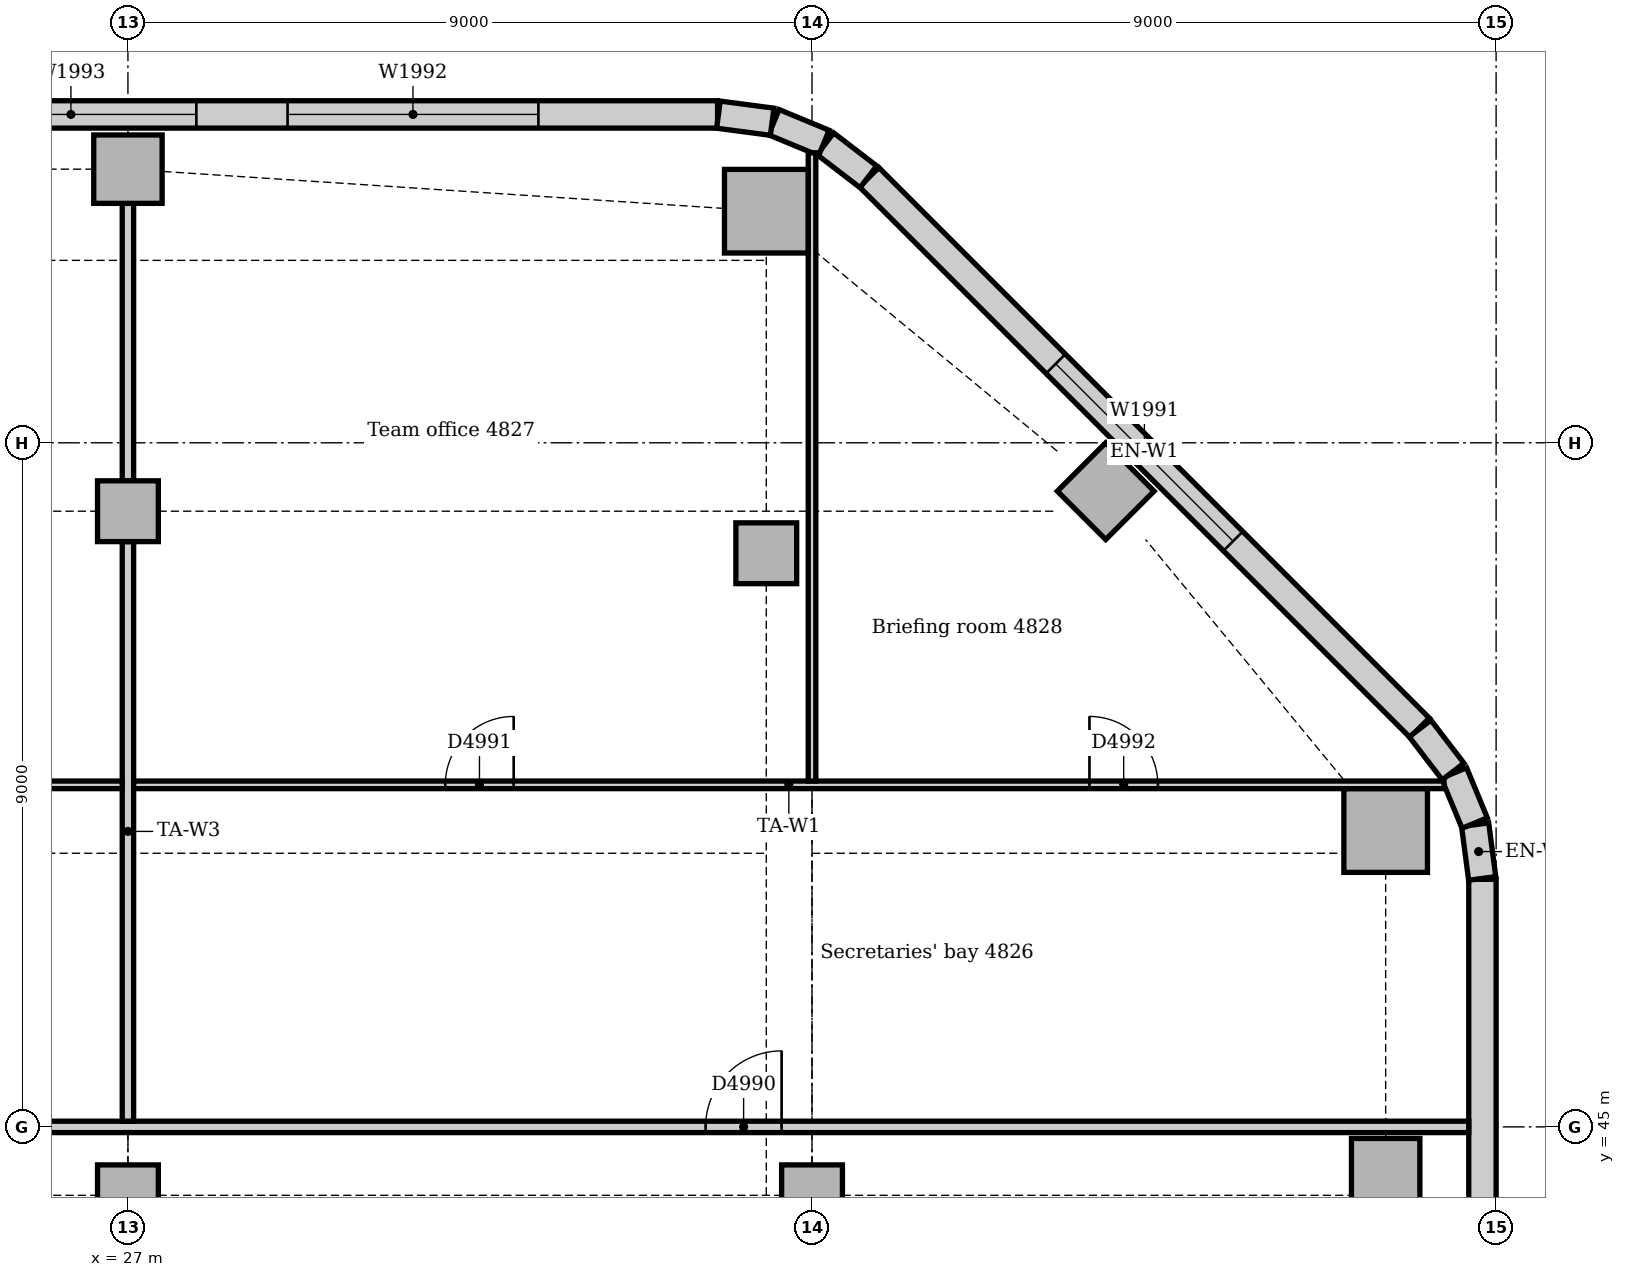
"""IFC4 building model, lengths in metres.
Left out: names, types, materials, properties, quantities, classifications, styles, units other than length and angle.
Written with IfcOpenShell. Run it as: python <this file> out.ifc"""

import sys

from ifc_helpers import new_model, si_unit, direction, frame, frame_2d, origin, origin_2d, place, context, subcontext, project, spatial, rectangle, extrude, element, fill, save


model = new_model("IFC4")
c1 = context("Model", 3, precision=1e-05, world=origin(), true_north=direction((0.0, 1.0)))
c2 = subcontext(c1, "Body", "Model", "MODEL_VIEW")
j1 = project(units=[si_unit("LENGTHUNIT", "METRE"), si_unit("PLANEANGLEUNIT", "RADIAN")], contexts=[c1])
p1 = place(None, origin())
s1 = spatial("IfcSite", under=j1, at=p1, CompositionType="ELEMENT")
p2 = place(p1, origin())
s2 = spatial("IfcBuilding", under=s1, at=p2, CompositionType="ELEMENT")
p3 = place(p2, frame((0.0, 0.0, 202.0)))
s3 = spatial("IfcBuildingStorey", under=s2, at=p3, CompositionType="ELEMENT", Elevation=202.0)
for number, where, z_axis, x_axis in (
    (1, (43.547, 48.898, 0.0), (0.0, 0.0, 1.0), (1.0, 0.0, 0.0)),
    (2, (35.398, 57.047, 0.0), (0.0, 0.0, 1.0), (1.0, 0.0, 0.0)),
):
    element("IfcColumn", number, at=place(p3, frame(where, z_axis=z_axis, x_axis=x_axis)), inside=s3, PredefinedType="COLUMN", context=c2, shape_type="SweptSolid", body=[
        extrude(rectangle(XDim=1.1, YDim=1.1, at=origin_2d()), origin(), (0.0, 0.0, 1.0), 3.85),
    ])
for number, where, z_axis, x_axis in (
    (3, (43.547, 44.398, 0.0), (0.0, 0.0, 1.0), (1.0, 0.0, 0.0)),
    (4, (39.864, 53.364, 0.0), (0.0, 0.0, 1.0), (0.707, 0.707, 0.0)),
    (5, (27.0, 57.6, 0.0), (0.0, 0.0, 1.0), (1.0, 0.0, 0.0)),
):
    element("IfcColumn", number, at=place(p3, frame(where, z_axis=z_axis, x_axis=x_axis)), inside=s3, PredefinedType="COLUMN", context=c2, shape_type="SweptSolid", body=[
        extrude(rectangle(XDim=0.9, YDim=0.9, at=origin_2d()), origin(), (0.0, 0.0, 1.0), 3.85),
    ])
for number, where, z_axis, x_axis in (
    (6, (27.0, 44.1, 0.0), (0.0, 0.0, 1.0), (1.0, 0.0, 0.0)),
    (7, (27.0, 53.1, 0.0), (0.0, 0.0, 1.0), (1.0, 0.0, 0.0)),
    (8, (36.0, 44.1, 0.0), (0.0, 0.0, 1.0), (1.0, 0.0, 0.0)),
    (9, (35.398, 52.547, 0.0), (0.0, 0.0, 1.0), (1.0, 0.0, 0.0)),
):
    element("IfcColumn", number, at=place(p3, frame(where, z_axis=z_axis, x_axis=x_axis)), inside=s3, PredefinedType="COLUMN", context=c2, shape_type="SweptSolid", body=[
        extrude(rectangle(XDim=0.8, YDim=0.8, at=origin_2d()), origin(), (0.0, 0.0, 1.0), 3.85),
    ])
p4 = place(p3, frame((44.82, 23.743, 0.0), z_axis=(0.0, 0.0, 1.0), x_axis=(0.0, 1.0, 0.0)))
e10 = element("IfcWall", 10, at=p4, inside=s3, PredefinedType="STANDARD", context=c2, shape_type="SweptSolid", body=[
    extrude(rectangle(XDim=24.515, YDim=0.36, at=frame_2d((12.257, 0.0))), origin(), (0.0, 0.0, 1.0), 3.85),
])
p5 = place(p4, frame((3.857, 0.0, 0.9)))
e11 = element("IfcOpeningElement", 11, at=p5, cuts=e10, PredefinedType="OPENING", context=c2, shape_type="SweptSolid", body=[
    extrude(rectangle(XDim=3.3, YDim=1.6, at=frame_2d((1.65, 0.8))), frame((0.0, 0.19, 0.0), z_axis=(0.0, -1.0, 0.0), x_axis=(1.0, 0.0, 0.0)), (0.0, 0.0, 1.0), 0.38),
])
p6 = place(p4, frame((8.357, 0.0, 0.9)))
e12 = element("IfcOpeningElement", 12, at=p6, cuts=e10, PredefinedType="OPENING", context=c2, shape_type="SweptSolid", body=[
    extrude(rectangle(XDim=3.3, YDim=1.6, at=frame_2d((1.65, 0.8))), frame((0.0, 0.19, 0.0), z_axis=(0.0, -1.0, 0.0), x_axis=(1.0, 0.0, 0.0)), (0.0, 0.0, 1.0), 0.38),
])
p7 = place(p4, frame((12.857, 0.0, 0.9)))
e13 = element("IfcOpeningElement", 13, at=p7, cuts=e10, PredefinedType="OPENING", context=c2, shape_type="SweptSolid", body=[
    extrude(rectangle(XDim=3.3, YDim=1.6, at=frame_2d((1.65, 0.8))), frame((0.0, 0.19, 0.0), z_axis=(0.0, -1.0, 0.0), x_axis=(1.0, 0.0, 0.0)), (0.0, 0.0, 1.0), 0.38),
])
p8 = place(p4, frame((18.457, 0.0, 0.9)))
e14 = element("IfcOpeningElement", 14, at=p8, cuts=e10, PredefinedType="OPENING", context=c2, shape_type="SweptSolid", body=[
    extrude(rectangle(XDim=1.8, YDim=1.6, at=frame_2d((0.9, 0.8))), frame((0.0, 0.19, 0.0), z_axis=(0.0, -1.0, 0.0), x_axis=(1.0, 0.0, 0.0)), (0.0, 0.0, 1.0), 0.38),
])
p9 = place(p3, frame((43.994, 50.251, 0.0), z_axis=(0.0, 0.0, 1.0), x_axis=(-0.707106781187, 0.707106781187, 0.0)))
e15 = element("IfcWall", 15, at=p9, inside=s3, PredefinedType="STANDARD", context=c2, shape_type="SweptSolid", body=[
    extrude(rectangle(XDim=10.243, YDim=0.36, at=frame_2d((5.121, 0.0))), origin(), (0.0, 0.0, 1.0), 3.85),
])
p10 = place(p9, frame((3.471, 0.0, 0.9)))
e16 = element("IfcOpeningElement", 16, at=p10, cuts=e15, PredefinedType="OPENING", context=c2, shape_type="SweptSolid", body=[
    extrude(rectangle(XDim=3.3, YDim=1.6, at=frame_2d((1.65, 0.8))), frame((0.0, 0.19, 0.0), z_axis=(0.0, -1.0, 0.0), x_axis=(1.0, 0.0, 0.0)), (0.0, 0.0, 1.0), 0.38),
])
p11 = place(p3, frame((34.757, 58.32, 0.0), z_axis=(0.0, 0.0, 1.0), x_axis=(-1.0, 0.0, 0.0)))
e17 = element("IfcWall", 17, at=p11, inside=s3, PredefinedType="STANDARD", context=c2, shape_type="SweptSolid", body=[
    extrude(rectangle(XDim=30.515, YDim=0.36, at=frame_2d((15.257, 0.0))), origin(), (0.0, 0.0, 1.0), 3.85),
])
p12 = place(p11, frame((2.357, 0.0, 0.9)))
e18 = element("IfcOpeningElement", 18, at=p12, cuts=e17, PredefinedType="OPENING", context=c2, shape_type="SweptSolid", body=[
    extrude(rectangle(XDim=3.3, YDim=1.6, at=frame_2d((1.65, 0.8))), frame((0.0, 0.19, 0.0), z_axis=(0.0, -1.0, 0.0), x_axis=(1.0, 0.0, 0.0)), (0.0, 0.0, 1.0), 0.38),
])
p13 = place(p11, frame((6.857, 0.0, 0.9)))
e19 = element("IfcOpeningElement", 19, at=p13, cuts=e17, PredefinedType="OPENING", context=c2, shape_type="SweptSolid", body=[
    extrude(rectangle(XDim=3.3, YDim=1.6, at=frame_2d((1.65, 0.8))), frame((0.0, 0.19, 0.0), z_axis=(0.0, -1.0, 0.0), x_axis=(1.0, 0.0, 0.0)), (0.0, 0.0, 1.0), 0.38),
])
p14 = place(p11, frame((11.357, 0.0, 0.9)))
e20 = element("IfcOpeningElement", 20, at=p14, cuts=e17, PredefinedType="OPENING", context=c2, shape_type="SweptSolid", body=[
    extrude(rectangle(XDim=3.3, YDim=1.6, at=frame_2d((1.65, 0.8))), frame((0.0, 0.19, 0.0), z_axis=(0.0, -1.0, 0.0), x_axis=(1.0, 0.0, 0.0)), (0.0, 0.0, 1.0), 0.38),
])
p15 = place(p11, frame((15.857, 0.0, 0.9)))
e21 = element("IfcOpeningElement", 21, at=p15, cuts=e17, PredefinedType="OPENING", context=c2, shape_type="SweptSolid", body=[
    extrude(rectangle(XDim=3.3, YDim=1.6, at=frame_2d((1.65, 0.8))), frame((0.0, 0.19, 0.0), z_axis=(0.0, -1.0, 0.0), x_axis=(1.0, 0.0, 0.0)), (0.0, 0.0, 1.0), 0.38),
])
p16 = place(p11, frame((20.357, 0.0, 0.9)))
e22 = element("IfcOpeningElement", 22, at=p16, cuts=e17, PredefinedType="OPENING", context=c2, shape_type="SweptSolid", body=[
    extrude(rectangle(XDim=3.3, YDim=1.6, at=frame_2d((1.65, 0.8))), frame((0.0, 0.19, 0.0), z_axis=(0.0, -1.0, 0.0), x_axis=(1.0, 0.0, 0.0)), (0.0, 0.0, 1.0), 0.38),
])
p17 = place(p11, frame((24.857, 0.0, 0.9)))
e23 = element("IfcOpeningElement", 23, at=p17, cuts=e17, PredefinedType="OPENING", context=c2, shape_type="SweptSolid", body=[
    extrude(rectangle(XDim=3.3, YDim=1.6, at=frame_2d((1.65, 0.8))), frame((0.0, 0.19, 0.0), z_axis=(0.0, -1.0, 0.0), x_axis=(1.0, 0.0, 0.0)), (0.0, 0.0, 1.0), 0.38),
])
for number, where, z_axis, x_axis in (
    (24, (44.817, 48.269, 0.0), (0.0, 0.0, 1.0), (-0.131, 0.991, 0.0)),
    (25, (44.718, 48.997, 0.0), (0.0, 0.0, 1.0), (-0.383, 0.924, 0.0)),
):
    element("IfcWall", number, at=place(p3, frame(where, z_axis=z_axis, x_axis=x_axis)), inside=s3, PredefinedType="STANDARD", context=c2, shape_type="SweptSolid", body=[
        extrude(rectangle(XDim=0.713, YDim=0.36, at=frame_2d((0.356, 0.0))), origin(), (0.0, 0.0, 1.0), 3.85),
    ])
for number, where, z_axis, x_axis in (
    (26, (44.434, 49.675, 0.0), (0.0, 0.0, 1.0), (-0.609, 0.793, 0.0)),
    (27, (36.741, 57.5, 0.0), (0.0, 0.0, 1.0), (-0.793, 0.609, 0.0)),
):
    element("IfcWall", number, at=place(p3, frame(where, z_axis=z_axis, x_axis=x_axis)), inside=s3, PredefinedType="STANDARD", context=c2, shape_type="SweptSolid", body=[
        extrude(rectangle(XDim=0.713, YDim=0.36, at=frame_2d((0.357, 0.0))), origin(), (0.0, 0.0, 1.0), 3.85),
    ])
for number, where, z_axis, x_axis in (
    (28, (36.156, 57.945, 0.0), (0.0, 0.0, 1.0), (-0.924, 0.383, 0.0)),
    (29, (35.476, 58.224, 0.0), (0.0, 0.0, 1.0), (-0.991, 0.131, 0.0)),
):
    element("IfcWall", number, at=place(p3, frame(where, z_axis=z_axis, x_axis=x_axis)), inside=s3, PredefinedType="STANDARD", context=c2, shape_type="SweptSolid", body=[
        extrude(rectangle(XDim=0.713, YDim=0.36, at=frame_2d((0.356, 0.0))), origin(), (0.0, 0.0, 1.0), 3.85),
    ])
p18 = place(p3, frame((0.36, 45.0, 0.0), z_axis=(0.0, 0.0, 1.0), x_axis=(1.0, 0.0, 0.0)))
e30 = element("IfcWall", 30, at=p18, inside=s3, PredefinedType="PARTITIONING", context=c2, shape_type="SweptSolid", body=[
    extrude(rectangle(XDim=44.28, YDim=0.15, at=frame_2d((22.14, 0.0))), origin(), (0.0, 0.0, 1.0), 3.85),
])
p19 = place(p18, frame((3.95, 0.0, 0.0)))
e31 = element("IfcOpeningElement", 31, at=p19, cuts=e30, PredefinedType="OPENING", context=c2, shape_type="SweptSolid", body=[
    extrude(rectangle(XDim=0.9, YDim=2.1, at=frame_2d((0.45, 1.05))), frame((0.0, 0.085, 0.0), z_axis=(0.0, -1.0, 0.0), x_axis=(1.0, 0.0, 0.0)), (0.0, 0.0, 1.0), 0.17),
])
p20 = place(p18, frame((16.24, 0.0, 0.0)))
e32 = element("IfcOpeningElement", 32, at=p20, cuts=e30, PredefinedType="OPENING", context=c2, shape_type="SweptSolid", body=[
    extrude(rectangle(XDim=1.0, YDim=2.1, at=frame_2d((0.5, 1.05))), frame((0.0, 0.085, 0.0), z_axis=(0.0, -1.0, 0.0), x_axis=(1.0, 0.0, 0.0)), (0.0, 0.0, 1.0), 0.17),
])
p21 = place(p18, frame((34.24, 0.0, 0.0)))
e33 = element("IfcOpeningElement", 33, at=p21, cuts=e30, PredefinedType="OPENING", context=c2, shape_type="SweptSolid", body=[
    extrude(rectangle(XDim=1.0, YDim=2.1, at=frame_2d((0.5, 1.05))), frame((0.0, 0.085, 0.0), z_axis=(0.0, -1.0, 0.0), x_axis=(1.0, 0.0, 0.0)), (0.0, 0.0, 1.0), 0.17),
])
p22 = place(p3, frame((27.0, 45.075, 0.0), z_axis=(0.0, 0.0, 1.0), x_axis=(0.0, 1.0, 0.0)))
e34 = element("IfcWall", 34, at=p22, inside=s3, PredefinedType="PARTITIONING", context=c2, shape_type="SweptSolid", body=[
    extrude(rectangle(XDim=7.625, YDim=0.15, at=frame_2d((3.812, 0.0))), origin(), (0.0, 0.0, 1.0), 3.35),
])
p23 = place(p3, frame((27.0, 53.5, 0.0), z_axis=(0.0, 0.0, 1.0), x_axis=(0.0, 1.0, 0.0)))
e35 = element("IfcWall", 35, at=p23, inside=s3, PredefinedType="PARTITIONING", context=c2, shape_type="SweptSolid", body=[
    extrude(rectangle(XDim=3.65, YDim=0.15, at=frame_2d((1.825, 0.0))), origin(), (0.0, 0.0, 1.0), 3.41),
])
p24 = place(p3, frame((8.95, 49.5, 0.0), z_axis=(0.0, 0.0, 1.0), x_axis=(1.0, 0.0, 0.0)))
e36 = element("IfcWall", 36, at=p24, inside=s3, PredefinedType="PARTITIONING", context=c2, shape_type="SweptSolid", body=[
    extrude(rectangle(XDim=17.975, YDim=0.1, at=frame_2d((8.988, 0.0))), origin(), (0.0, 0.0, 1.0), 3.85),
])
p25 = place(p24, frame((4.15, 0.0, 0.0)))
e37 = element("IfcOpeningElement", 37, at=p25, cuts=e36, PredefinedType="OPENING", context=c2, shape_type="SweptSolid", body=[
    extrude(rectangle(XDim=0.9, YDim=2.1, at=frame_2d((0.45, 1.05))), frame((0.0, 0.06, 0.0), z_axis=(0.0, -1.0, 0.0), x_axis=(1.0, 0.0, 0.0)), (0.0, 0.0, 1.0), 0.12),
])
p26 = place(p24, frame((13.0, 0.0, 0.0)))
e38 = element("IfcOpeningElement", 38, at=p26, cuts=e36, PredefinedType="OPENING", context=c2, shape_type="SweptSolid", body=[
    extrude(rectangle(XDim=0.9, YDim=2.1, at=frame_2d((0.45, 1.05))), frame((0.0, 0.06, 0.0), z_axis=(0.0, -1.0, 0.0), x_axis=(1.0, 0.0, 0.0)), (0.0, 0.0, 1.0), 0.12),
])
p27 = place(p3, frame((27.075, 49.5, 0.0), z_axis=(0.0, 0.0, 1.0), x_axis=(1.0, 0.0, 0.0)))
e39 = element("IfcWall", 39, at=p27, inside=s3, PredefinedType="PARTITIONING", context=c2, shape_type="SweptSolid", body=[
    extrude(rectangle(XDim=17.24, YDim=0.1, at=frame_2d((8.62, 0.0))), origin(), (0.0, 0.0, 1.0), 3.85),
])
p28 = place(p27, frame((4.1, 0.0, 0.0)))
e40 = element("IfcOpeningElement", 40, at=p28, cuts=e39, PredefinedType="OPENING", context=c2, shape_type="SweptSolid", body=[
    extrude(rectangle(XDim=0.9, YDim=2.1, at=frame_2d((0.45, 1.05))), frame((0.0, 0.06, 0.0), z_axis=(0.0, -1.0, 0.0), x_axis=(1.0, 0.0, 0.0)), (0.0, 0.0, 1.0), 0.12),
])
p29 = place(p27, frame((12.575, 0.0, 0.0)))
e41 = element("IfcOpeningElement", 41, at=p29, cuts=e39, PredefinedType="OPENING", context=c2, shape_type="SweptSolid", body=[
    extrude(rectangle(XDim=0.9, YDim=2.1, at=frame_2d((0.45, 1.05))), frame((0.0, 0.06, 0.0), z_axis=(0.0, -1.0, 0.0), x_axis=(1.0, 0.0, 0.0)), (0.0, 0.0, 1.0), 0.12),
])
p30 = place(p3, frame((36.0, 49.55, 0.0), z_axis=(0.0, 0.0, 1.0), x_axis=(0.0, 1.0, 0.0)))
e42 = element("IfcWall", 42, at=p30, inside=s3, PredefinedType="PARTITIONING", context=c2, shape_type="SweptSolid", body=[
    extrude(rectangle(XDim=8.265, YDim=0.1, at=frame_2d((4.133, 0.0))), origin(), (0.0, 0.0, 1.0), 3.35),
])
p31 = place(p10, origin())
e43 = element("IfcWindow", 43, at=p31, inside=s3, PartitioningType="SINGLE_PANEL", PredefinedType="WINDOW", context=c2, shape_type="SweptSolid", body=[
    extrude(rectangle(XDim=3.3, YDim=1.6, at=frame_2d((1.65, 0.8))), frame((0.0, 0.13, 0.0), z_axis=(0.0, -1.0, 0.0), x_axis=(1.0, 0.0, 0.0)), (0.0, 0.0, 1.0), 0.06),
])
fill(e16, e43)
p32 = place(p12, origin())
e44 = element("IfcWindow", 44, at=p32, inside=s3, PartitioningType="SINGLE_PANEL", PredefinedType="WINDOW", context=c2, shape_type="SweptSolid", body=[
    extrude(rectangle(XDim=3.3, YDim=1.6, at=frame_2d((1.65, 0.8))), frame((0.0, 0.13, 0.0), z_axis=(0.0, -1.0, 0.0), x_axis=(1.0, 0.0, 0.0)), (0.0, 0.0, 1.0), 0.06),
])
fill(e18, e44)
p33 = place(p13, origin())
e45 = element("IfcWindow", 45, at=p33, inside=s3, PartitioningType="SINGLE_PANEL", PredefinedType="WINDOW", context=c2, shape_type="SweptSolid", body=[
    extrude(rectangle(XDim=3.3, YDim=1.6, at=frame_2d((1.65, 0.8))), frame((0.0, 0.13, 0.0), z_axis=(0.0, -1.0, 0.0), x_axis=(1.0, 0.0, 0.0)), (0.0, 0.0, 1.0), 0.06),
])
fill(e19, e45)
p34 = place(p21, origin())
e46 = element("IfcDoor", 46, at=p34, inside=s3, OperationType="SINGLE_SWING_RIGHT", PredefinedType="DOOR", context=c2, shape_type="SweptSolid", body=[
    extrude(rectangle(XDim=1.0, YDim=2.1, at=frame_2d((0.5, 1.05))), frame((0.0, 0.025, 0.0), z_axis=(0.0, -1.0, 0.0), x_axis=(1.0, 0.0, 0.0)), (0.0, 0.0, 1.0), 0.05),
])
fill(e33, e46)
p35 = place(p28, origin())
e47 = element("IfcDoor", 47, at=p35, inside=s3, OperationType="SINGLE_SWING_RIGHT", PredefinedType="DOOR", context=c2, shape_type="SweptSolid", body=[
    extrude(rectangle(XDim=0.9, YDim=2.1, at=frame_2d((0.45, 1.05))), frame((0.0, 0.025, 0.0), z_axis=(0.0, -1.0, 0.0), x_axis=(1.0, 0.0, 0.0)), (0.0, 0.0, 1.0), 0.05),
])
fill(e40, e47)
p36 = place(p29, origin())
e48 = element("IfcDoor", 48, at=p36, inside=s3, OperationType="SINGLE_SWING_LEFT", PredefinedType="DOOR", context=c2, shape_type="SweptSolid", body=[
    extrude(rectangle(XDim=0.9, YDim=2.1, at=frame_2d((0.45, 1.05))), frame((0.0, 0.025, 0.0), z_axis=(0.0, -1.0, 0.0), x_axis=(1.0, 0.0, 0.0)), (0.0, 0.0, 1.0), 0.05),
])
fill(e41, e48)
save(model, sys.argv[1])
